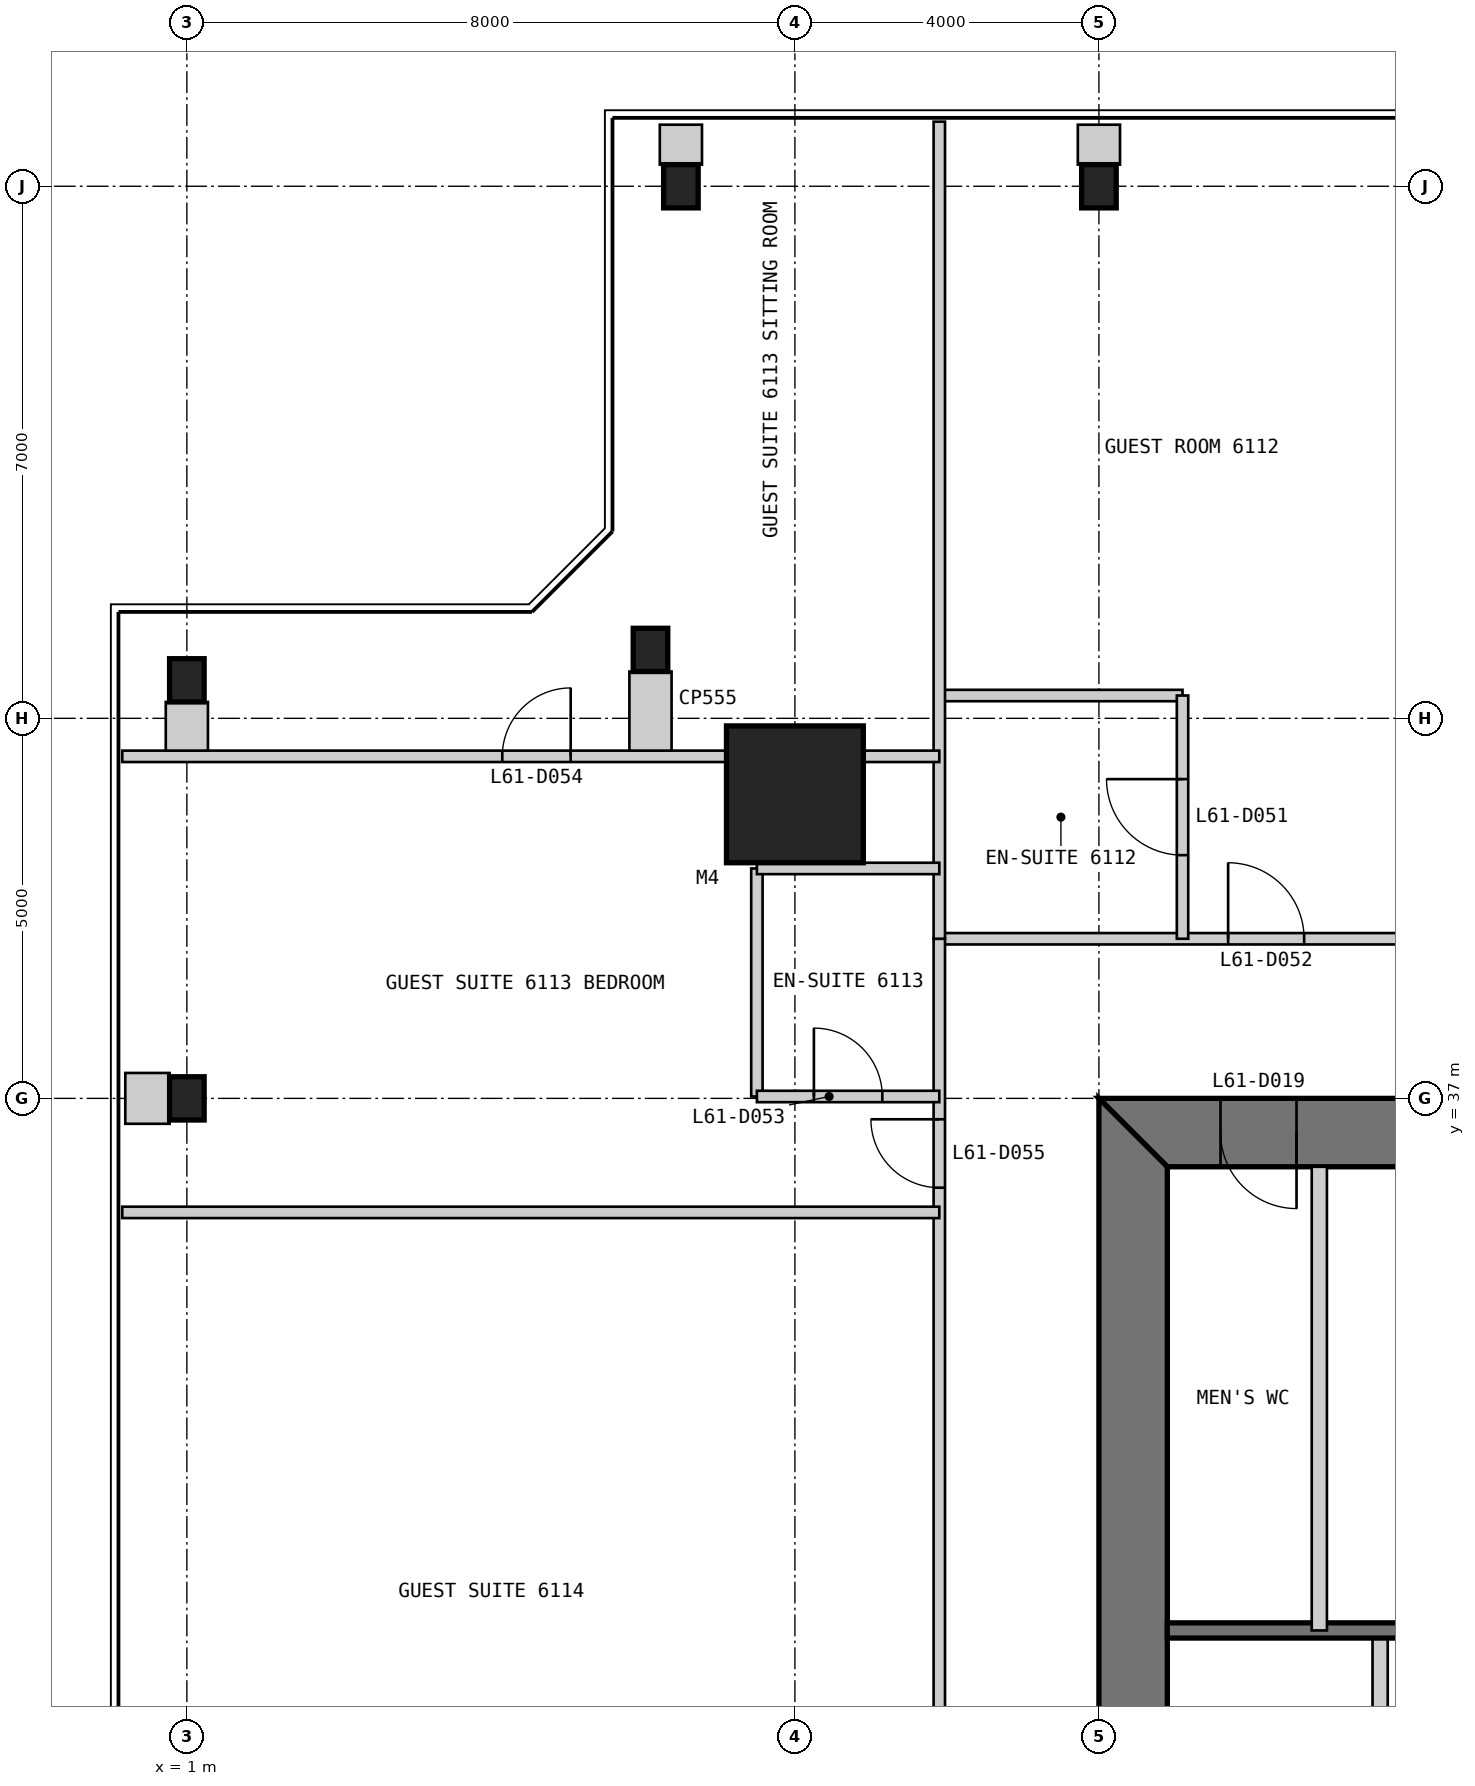
"""IFC4 building model, lengths in metres.
Left out: names, types, materials, properties, quantities, classifications, styles, units other than length and angle.
Written with IfcOpenShell. Run it as: python <this file> out.ifc"""

import sys

from ifc_helpers import new_model, si_unit, direction, frame, frame_2d, origin, origin_2d, place, context, subcontext, project, spatial, polyline, rectangle, i_section, outline, extrude, element, fill, save


model = new_model("IFC4")
c1 = context("Model", 3, precision=1e-05, world=origin(), true_north=direction((0.0, 1.0)))
c2 = subcontext(c1, "Body", "Model", "MODEL_VIEW")
j1 = project(units=[si_unit("LENGTHUNIT", "METRE"), si_unit("PLANEANGLEUNIT", "RADIAN")], contexts=[c1])
p1 = place(None, origin())
s1 = spatial("IfcSite", under=j1, at=p1, CompositionType="ELEMENT")
p2 = place(p1, origin())
s2 = spatial("IfcBuilding", under=s1, at=p2, CompositionType="ELEMENT")
p3 = place(p2, frame((0.0, 0.0, 259.4)))
s3 = spatial("IfcBuildingStorey", under=s2, at=p3, CompositionType="ELEMENT", Elevation=259.4)
p4 = place(p3, frame((9.0, 41.0, 0.0), z_axis=(0.0, 0.0, 1.0), x_axis=(1.0, 0.0, 0.0)))
e1 = element("IfcColumn", 1, at=p4, inside=s3, PredefinedType="COLUMN", context=c2, shape_type="SweptSolid", body=[
    extrude(rectangle(XDim=1.8, YDim=1.8, at=origin_2d()), origin(), (0.0, 0.0, 1.0), 3.4),
])
for number, where, z_axis, x_axis in (
    (2, (13.0, 49.0, 0.0), (0.0, 0.0, 1.0), (1.0, 0.0, 0.0)),
    (3, (7.5, 49.0, 0.0), (0.0, 0.0, 1.0), (1.0, 0.0, 0.0)),
    (4, (7.1, 42.9, 0.0), (0.0, 0.0, 1.0), (1.0, 0.0, 0.0)),
    (5, (1.0, 42.5, 0.0), (0.0, 0.0, 1.0), (1.0, 0.0, 0.0)),
    (6, (1.0, 37.0, 0.0), (0.0, 0.0, 1.0), (1.0, 0.0, 0.0)),
):
    element("IfcColumn", number, at=place(p3, frame(where, z_axis=z_axis, x_axis=x_axis)), inside=s3, PredefinedType="COLUMN", context=c2, shape_type="SweptSolid", body=[
        extrude(i_section(OverallWidth=0.455, OverallDepth=0.569, WebThickness=0.078, FlangeThickness=0.125, at=origin_2d()), origin(), (0.0, 0.0, 1.0), 3.4),
    ])
p5 = place(p3, frame((37.0, 36.55, 0.0), z_axis=(0.0, 0.0, 1.0), x_axis=(-1.0, 0.0, 0.0)))
e7 = element("IfcWall", 7, at=p5, inside=s3, PredefinedType="SHEAR", context=c2, shape_type="SweptSolid", body=[
    extrude(outline(polyline([(0.0, -0.45), (24.0, -0.45), (23.1, 0.45), (0.9, 0.45), (0.0, -0.45)])), origin(), (0.0, 0.0, 1.0), 3.4),
])
p6 = place(p5, frame((4.9, 0.0, 0.0)))
e8 = element("IfcOpeningElement", 8, at=p6, cuts=e7, PredefinedType="OPENING", context=c2, shape_type="SweptSolid", body=[
    extrude(rectangle(XDim=1.0, YDim=2.2, at=frame_2d((0.5, 1.1))), frame((0.0, 0.46, 0.0), z_axis=(0.0, -1.0, 0.0), x_axis=(1.0, 0.0, 0.0)), (0.0, 0.0, 1.0), 0.92),
])
p7 = place(p5, frame((8.9, 0.0, 0.0)))
e9 = element("IfcOpeningElement", 9, at=p7, cuts=e7, PredefinedType="OPENING", context=c2, shape_type="SweptSolid", body=[
    extrude(rectangle(XDim=1.1, YDim=2.2, at=frame_2d((0.55, 1.1))), frame((0.0, 0.46, 0.0), z_axis=(0.0, -1.0, 0.0), x_axis=(1.0, 0.0, 0.0)), (0.0, 0.0, 1.0), 0.92),
])
p8 = place(p5, frame((15.05, 0.0, 0.0)))
e10 = element("IfcOpeningElement", 10, at=p8, cuts=e7, PredefinedType="OPENING", context=c2, shape_type="SweptSolid", body=[
    extrude(rectangle(XDim=0.9, YDim=2.2, at=frame_2d((0.45, 1.1))), frame((0.0, 0.46, 0.0), z_axis=(0.0, -1.0, 0.0), x_axis=(1.0, 0.0, 0.0)), (0.0, 0.0, 1.0), 0.92),
])
p9 = place(p5, frame((17.9, 0.0, 0.0)))
e11 = element("IfcOpeningElement", 11, at=p9, cuts=e7, PredefinedType="OPENING", context=c2, shape_type="SweptSolid", body=[
    extrude(rectangle(XDim=1.0, YDim=2.2, at=frame_2d((0.5, 1.1))), frame((0.0, 0.46, 0.0), z_axis=(0.0, -1.0, 0.0), x_axis=(1.0, 0.0, 0.0)), (0.0, 0.0, 1.0), 0.92),
])
p10 = place(p5, frame((21.4, 0.0, 0.0)))
e12 = element("IfcOpeningElement", 12, at=p10, cuts=e7, PredefinedType="OPENING", context=c2, shape_type="SweptSolid", body=[
    extrude(rectangle(XDim=1.0, YDim=2.2, at=frame_2d((0.5, 1.1))), frame((0.0, 0.46, 0.0), z_axis=(0.0, -1.0, 0.0), x_axis=(1.0, 0.0, 0.0)), (0.0, 0.0, 1.0), 0.92),
])
p11 = place(p3, frame((13.45, 36.1, 0.0), z_axis=(0.0, 0.0, 1.0), x_axis=(0.0, -1.0, 0.0)))
e13 = element("IfcWall", 13, at=p11, inside=s3, PredefinedType="SHEAR", context=c2, shape_type="SweptSolid", body=[
    extrude(outline(polyline([(-0.9, -0.45), (23.1, -0.45), (22.2, 0.45), (0.0, 0.45), (-0.9, -0.45)])), origin(), (0.0, 0.0, 1.0), 3.4),
])
p12 = place(p11, frame((20.2, 0.0, 0.0)))
e14 = element("IfcOpeningElement", 14, at=p12, cuts=e13, PredefinedType="OPENING", context=c2, shape_type="SweptSolid", body=[
    extrude(rectangle(XDim=1.0, YDim=2.2, at=frame_2d((0.5, 1.1))), frame((0.0, 0.46, 0.0), z_axis=(0.0, -1.0, 0.0), x_axis=(1.0, 0.0, 0.0)), (0.0, 0.0, 1.0), 0.92),
])
p13 = place(p11, frame((17.25, 0.0, 0.0)))
e15 = element("IfcOpeningElement", 15, at=p13, cuts=e13, PredefinedType="OPENING", context=c2, shape_type="SweptSolid", body=[
    extrude(rectangle(XDim=0.9, YDim=2.2, at=frame_2d((0.45, 1.1))), frame((0.0, 0.46, 0.0), z_axis=(0.0, -1.0, 0.0), x_axis=(1.0, 0.0, 0.0)), (0.0, 0.0, 1.0), 0.92),
])
p14 = place(p3, frame((16.7, 13.9, 0.0), z_axis=(0.0, 0.0, 1.0), x_axis=(0.0, 1.0, 0.0)))
e16 = element("IfcWall", 16, at=p14, inside=s3, PredefinedType="PARTITIONING", context=c2, shape_type="SweptSolid", body=[
    extrude(rectangle(XDim=16.1, YDim=0.2, at=frame_2d((8.05, 0.0))), origin(), (0.0, 0.0, 1.0), 3.2),
])
p15 = place(p14, frame((6.15, 0.0, 0.0)))
e17 = element("IfcOpeningElement", 17, at=p15, cuts=e16, PredefinedType="OPENING", context=c2, shape_type="SweptSolid", body=[
    extrude(rectangle(XDim=0.9, YDim=2.2, at=frame_2d((0.45, 1.1))), frame((0.0, 0.11, 0.0), z_axis=(0.0, -1.0, 0.0), x_axis=(1.0, 0.0, 0.0)), (0.0, 0.0, 1.0), 0.22),
])
p16 = place(p14, frame((8.65, 0.0, 0.0)))
e18 = element("IfcOpeningElement", 18, at=p16, cuts=e16, PredefinedType="OPENING", context=c2, shape_type="SweptSolid", body=[
    extrude(rectangle(XDim=0.9, YDim=2.2, at=frame_2d((0.45, 1.1))), frame((0.0, 0.11, 0.0), z_axis=(0.0, -1.0, 0.0), x_axis=(1.0, 0.0, 0.0)), (0.0, 0.0, 1.0), 0.22),
])
p17 = place(p14, frame((12.8, 0.0, 0.0)))
e19 = element("IfcOpeningElement", 19, at=p17, cuts=e16, PredefinedType="OPENING", context=c2, shape_type="SweptSolid", body=[
    extrude(rectangle(XDim=0.9, YDim=2.2, at=frame_2d((0.45, 1.1))), frame((0.0, 0.11, 0.0), z_axis=(0.0, -1.0, 0.0), x_axis=(1.0, 0.0, 0.0)), (0.0, 0.0, 1.0), 0.22),
])
p18 = place(p3, frame((29.7, 30.0, 0.0), z_axis=(0.0, 0.0, 1.0), x_axis=(-1.0, 0.0, 0.0)))
e20 = element("IfcWall", 20, at=p18, inside=s3, PredefinedType="SOLIDWALL", context=c2, shape_type="SweptSolid", body=[
    extrude(rectangle(XDim=15.8, YDim=0.2, at=frame_2d((7.9, 0.0))), origin(), (0.0, 0.0, 1.0), 3.2),
])
p19 = place(p3, frame((15.9, 36.1, 0.0), z_axis=(0.0, 0.0, 1.0), x_axis=(0.0, -1.0, 0.0)))
e21 = element("IfcWall", 21, at=p19, inside=s3, PredefinedType="PARTITIONING", context=c2, shape_type="SweptSolid", body=[
    extrude(rectangle(XDim=6.1, YDim=0.2, at=frame_2d((3.05, 0.0))), origin(), (0.0, 0.0, 1.0), 3.2),
])
p20 = place(p3, frame((39.1, 39.1, 0.0), z_axis=(0.0, 0.0, 1.0), x_axis=(-1.0, 0.0, 0.0)))
e22 = element("IfcWall", 22, at=p20, inside=s3, PredefinedType="PARTITIONING", context=c2, shape_type="SweptSolid", body=[
    extrude(rectangle(XDim=28.2, YDim=0.15, at=frame_2d((14.1, 0.0))), origin(), (0.0, 0.0, 1.0), 3.25),
])
p21 = place(p20, frame((2.375, 0.0, 0.0)))
e23 = element("IfcOpeningElement", 23, at=p21, cuts=e22, PredefinedType="OPENING", context=c2, shape_type="SweptSolid", body=[
    extrude(rectangle(XDim=0.9, YDim=2.1, at=frame_2d((0.45, 1.05))), frame((0.0, 0.085, 0.0), z_axis=(0.0, -1.0, 0.0), x_axis=(1.0, 0.0, 0.0)), (0.0, 0.0, 1.0), 0.17),
])
p22 = place(p20, frame((10.7, 0.0, 0.0)))
e24 = element("IfcOpeningElement", 24, at=p22, cuts=e22, PredefinedType="OPENING", context=c2, shape_type="SweptSolid", body=[
    extrude(rectangle(XDim=0.9, YDim=2.1, at=frame_2d((0.45, 1.05))), frame((0.0, 0.085, 0.0), z_axis=(0.0, -1.0, 0.0), x_axis=(1.0, 0.0, 0.0)), (0.0, 0.0, 1.0), 0.17),
])
p23 = place(p20, frame((17.1, 0.0, 0.0)))
e25 = element("IfcOpeningElement", 25, at=p23, cuts=e22, PredefinedType="OPENING", context=c2, shape_type="SweptSolid", body=[
    extrude(rectangle(XDim=0.9, YDim=2.1, at=frame_2d((0.45, 1.05))), frame((0.0, 0.085, 0.0), z_axis=(0.0, -1.0, 0.0), x_axis=(1.0, 0.0, 0.0)), (0.0, 0.0, 1.0), 0.17),
])
p24 = place(p20, frame((23.4, 0.0, 0.0)))
e26 = element("IfcOpeningElement", 26, at=p24, cuts=e22, PredefinedType="OPENING", context=c2, shape_type="SweptSolid", body=[
    extrude(rectangle(XDim=1.0, YDim=2.1, at=frame_2d((0.5, 1.05))), frame((0.0, 0.085, 0.0), z_axis=(0.0, -1.0, 0.0), x_axis=(1.0, 0.0, 0.0)), (0.0, 0.0, 1.0), 0.17),
])
p25 = place(p3, frame((14.1, 42.3, 0.0), z_axis=(0.0, 0.0, 1.0), x_axis=(-1.0, 0.0, 0.0)))
e27 = element("IfcWall", 27, at=p25, inside=s3, PredefinedType="PARTITIONING", context=c2, shape_type="SweptSolid", body=[
    extrude(rectangle(XDim=3.2, YDim=0.15, at=frame_2d((1.6, 0.0))), origin(), (0.0, 0.0, 1.0), 3.25),
])
p26 = place(p3, frame((14.1, 42.3, 0.0), z_axis=(0.0, 0.0, 1.0), x_axis=(0.0, -1.0, 0.0)))
e28 = element("IfcWall", 28, at=p26, inside=s3, PredefinedType="PARTITIONING", context=c2, shape_type="SweptSolid", body=[
    extrude(rectangle(XDim=3.2, YDim=0.15, at=frame_2d((1.6, 0.0))), origin(), (0.0, 0.0, 1.0), 3.25),
])
p27 = place(p26, frame((1.1, 0.0, 0.0)))
e29 = element("IfcOpeningElement", 29, at=p27, cuts=e28, PredefinedType="OPENING", context=c2, shape_type="SweptSolid", body=[
    extrude(rectangle(XDim=1.0, YDim=2.1, at=frame_2d((0.5, 1.05))), frame((0.0, 0.085, 0.0), z_axis=(0.0, -1.0, 0.0), x_axis=(1.0, 0.0, 0.0)), (0.0, 0.0, 1.0), 0.17),
])
p28 = place(p3, frame((10.9, 39.1, 0.0), z_axis=(0.0, 0.0, 1.0), x_axis=(0.0, -1.0, 0.0)))
e30 = element("IfcWall", 30, at=p28, inside=s3, PredefinedType="PARTITIONING", context=c2, shape_type="SweptSolid", body=[
    extrude(rectangle(XDim=28.2, YDim=0.15, at=frame_2d((14.1, 0.0))), origin(), (0.0, 0.0, 1.0), 3.25),
])
p29 = place(p28, frame((2.375, 0.0, 0.0)))
e31 = element("IfcOpeningElement", 31, at=p29, cuts=e30, PredefinedType="OPENING", context=c2, shape_type="SweptSolid", body=[
    extrude(rectangle(XDim=0.9, YDim=2.1, at=frame_2d((0.45, 1.05))), frame((0.0, 0.085, 0.0), z_axis=(0.0, -1.0, 0.0), x_axis=(1.0, 0.0, 0.0)), (0.0, 0.0, 1.0), 0.17),
])
p30 = place(p28, frame((10.7, 0.0, 0.0)))
e32 = element("IfcOpeningElement", 32, at=p30, cuts=e30, PredefinedType="OPENING", context=c2, shape_type="SweptSolid", body=[
    extrude(rectangle(XDim=0.9, YDim=2.1, at=frame_2d((0.45, 1.05))), frame((0.0, 0.085, 0.0), z_axis=(0.0, -1.0, 0.0), x_axis=(1.0, 0.0, 0.0)), (0.0, 0.0, 1.0), 0.17),
])
p31 = place(p28, frame((17.1, 0.0, 0.0)))
e33 = element("IfcOpeningElement", 33, at=p31, cuts=e30, PredefinedType="OPENING", context=c2, shape_type="SweptSolid", body=[
    extrude(rectangle(XDim=0.9, YDim=2.1, at=frame_2d((0.45, 1.05))), frame((0.0, 0.085, 0.0), z_axis=(0.0, -1.0, 0.0), x_axis=(1.0, 0.0, 0.0)), (0.0, 0.0, 1.0), 0.17),
])
p32 = place(p28, frame((23.7, 0.0, 0.0)))
e34 = element("IfcOpeningElement", 34, at=p32, cuts=e30, PredefinedType="OPENING", context=c2, shape_type="SweptSolid", body=[
    extrude(rectangle(XDim=0.9, YDim=2.1, at=frame_2d((0.45, 1.05))), frame((0.0, 0.085, 0.0), z_axis=(0.0, -1.0, 0.0), x_axis=(1.0, 0.0, 0.0)), (0.0, 0.0, 1.0), 0.17),
])
p33 = place(p3, frame((10.9, 49.85, 0.0), z_axis=(0.0, 0.0, 1.0), x_axis=(0.0, -1.0, 0.0)))
e35 = element("IfcWall", 35, at=p33, inside=s3, PredefinedType="PARTITIONING", context=c2, shape_type="SweptSolid", body=[
    extrude(rectangle(XDim=10.75, YDim=0.15, at=frame_2d((5.375, 0.0))), origin(), (0.0, 0.0, 1.0), 3.25),
])
p34 = place(p3, frame((8.5, 40.025, 0.0), z_axis=(0.0, 0.0, 1.0), x_axis=(0.0, -1.0, 0.0)))
e36 = element("IfcWall", 36, at=p34, inside=s3, PredefinedType="PARTITIONING", context=c2, shape_type="SweptSolid", body=[
    extrude(rectangle(XDim=3.0, YDim=0.15, at=frame_2d((1.5, 0.0))), origin(), (0.0, 0.0, 1.0), 3.25),
])
p35 = place(p3, frame((8.5, 37.025, 0.0), z_axis=(0.0, 0.0, 1.0), x_axis=(1.0, 0.0, 0.0)))
e37 = element("IfcWall", 37, at=p35, inside=s3, PredefinedType="PARTITIONING", context=c2, shape_type="SweptSolid", body=[
    extrude(rectangle(XDim=2.4, YDim=0.15, at=frame_2d((1.2, 0.0))), origin(), (0.0, 0.0, 1.0), 2.404),
])
p36 = place(p35, frame((0.75, 0.0, 0.0)))
e38 = element("IfcOpeningElement", 38, at=p36, cuts=e37, PredefinedType="OPENING", context=c2, shape_type="SweptSolid", body=[
    extrude(rectangle(XDim=0.9, YDim=2.1, at=frame_2d((0.45, 1.05))), frame((0.0, 0.085, 0.0), z_axis=(0.0, -1.0, 0.0), x_axis=(1.0, 0.0, 0.0)), (0.0, 0.0, 1.0), 0.17),
])
p37 = place(p3, frame((8.5, 40.025, 0.0), z_axis=(0.0, 0.0, 1.0), x_axis=(1.0, 0.0, 0.0)))
e39 = element("IfcWall", 39, at=p37, inside=s3, PredefinedType="PARTITIONING", context=c2, shape_type="SweptSolid", body=[
    extrude(rectangle(XDim=2.4, YDim=0.15, at=frame_2d((1.2, 0.0))), origin(), (0.0, 0.0, 1.0), 3.25),
])
p38 = place(p3, frame((0.15, 41.5, 0.0), z_axis=(0.0, 0.0, 1.0), x_axis=(1.0, 0.0, 0.0)))
e40 = element("IfcWall", 40, at=p38, inside=s3, PredefinedType="PARTITIONING", context=c2, shape_type="SweptSolid", body=[
    extrude(rectangle(XDim=10.75, YDim=0.15, at=frame_2d((5.375, 0.0))), origin(), (0.0, 0.0, 1.0), 3.25),
])
p39 = place(p38, frame((5.0, 0.0, 0.0)))
e41 = element("IfcOpeningElement", 41, at=p39, cuts=e40, PredefinedType="OPENING", context=c2, shape_type="SweptSolid", body=[
    extrude(rectangle(XDim=0.9, YDim=2.1, at=frame_2d((0.45, 1.05))), frame((0.0, 0.085, 0.0), z_axis=(0.0, -1.0, 0.0), x_axis=(1.0, 0.0, 0.0)), (0.0, 0.0, 1.0), 0.17),
])
p40 = place(p3, frame((0.15, 35.5, 0.0), z_axis=(0.0, 0.0, 1.0), x_axis=(1.0, 0.0, 0.0)))
e42 = element("IfcWall", 42, at=p40, inside=s3, PredefinedType="PARTITIONING", context=c2, shape_type="SweptSolid", body=[
    extrude(rectangle(XDim=10.75, YDim=0.15, at=frame_2d((5.375, 0.0))), origin(), (0.0, 0.0, 1.0), 3.25),
])
for number, where, z_axis, x_axis in (
    (43, (13.0, 49.81, 0.0), (0.0, 0.0, 1.0), (0.0, -1.0, 0.0)),
    (44, (7.5, 49.81, 0.0), (0.0, 0.0, 1.0), (0.0, -1.0, 0.0)),
):
    element("IfcWall", number, at=place(p3, frame(where, z_axis=z_axis, x_axis=x_axis)), inside=s3, PredefinedType="PARTITIONING", context=c2, shape_type="SweptSolid", body=[
        extrude(rectangle(XDim=0.526, YDim=0.555, at=frame_2d((0.263, 0.0))), origin(), (0.0, 0.0, 1.0), 3.25),
    ])
p41 = place(p3, frame((7.1, 41.575, 0.0), z_axis=(0.0, 0.0, 1.0), x_axis=(0.0, 1.0, 0.0)))
e45 = element("IfcWall", 45, at=p41, inside=s3, PredefinedType="PARTITIONING", context=c2, shape_type="SweptSolid", body=[
    extrude(rectangle(XDim=1.041, YDim=0.555, at=frame_2d((0.52, 0.0))), origin(), (0.0, 0.0, 1.0), 3.25),
])
p42 = place(p3, frame((1.0, 41.575, 0.0), z_axis=(0.0, 0.0, 1.0), x_axis=(0.0, 1.0, 0.0)))
e46 = element("IfcWall", 46, at=p42, inside=s3, PredefinedType="PARTITIONING", context=c2, shape_type="SweptSolid", body=[
    extrude(rectangle(XDim=0.641, YDim=0.555, at=frame_2d((0.32, 0.0))), origin(), (0.0, 0.0, 1.0), 2.338),
])
p43 = place(p3, frame((0.19, 37.0, 0.0), z_axis=(0.0, 0.0, 1.0), x_axis=(1.0, 0.0, 0.0)))
e47 = element("IfcWall", 47, at=p43, inside=s3, PredefinedType="PARTITIONING", context=c2, shape_type="SweptSolid", body=[
    extrude(rectangle(XDim=0.583, YDim=0.669, at=frame_2d((0.292, 0.0))), origin(), (0.0, 0.0, 1.0), 3.25),
])
p44 = place(p10, origin())
e48 = element("IfcDoor", 48, at=p44, inside=s3, OperationType="SINGLE_SWING_LEFT", PredefinedType="DOOR", context=c2, shape_type="SweptSolid", body=[
    extrude(rectangle(XDim=1.0, YDim=2.2, at=frame_2d((0.5, 1.1))), frame((0.0, 0.025, 0.0), z_axis=(0.0, -1.0, 0.0), x_axis=(1.0, 0.0, 0.0)), (0.0, 0.0, 1.0), 0.05),
    extrude(outline(polyline([(0.0, 0.0), (0.04, 0.0), (0.04, 2.16), (0.96, 2.16), (0.96, 0.0), (1.0, 0.0), (1.0, 2.2), (0.0, 2.2), (0.0, 0.0)])), frame((0.0, 0.3, 0.0), z_axis=(0.0, -1.0, 0.0), x_axis=(1.0, 0.0, 0.0)), (0.0, 0.0, 1.0), 0.6),
])
fill(e12, e48)
p45 = place(p27, frame((1.0, 0.0, 0.0), z_axis=(0.0, 0.0, 1.0), x_axis=(-1.0, 0.0, 0.0)))
e49 = element("IfcDoor", 49, at=p45, inside=s3, OperationType="SINGLE_SWING_RIGHT", PredefinedType="DOOR", context=c2, shape_type="SweptSolid", body=[
    extrude(rectangle(XDim=1.0, YDim=2.1, at=frame_2d((0.5, 1.05))), frame((0.0, 0.025, 0.0), z_axis=(0.0, -1.0, 0.0), x_axis=(1.0, 0.0, 0.0)), (0.0, 0.0, 1.0), 0.05),
])
fill(e29, e49)
p46 = place(p24, frame((1.0, 0.0, 0.0), z_axis=(0.0, 0.0, 1.0), x_axis=(-1.0, 0.0, 0.0)))
e50 = element("IfcDoor", 50, at=p46, inside=s3, OperationType="SINGLE_SWING_LEFT", PredefinedType="DOOR", context=c2, shape_type="SweptSolid", body=[
    extrude(rectangle(XDim=1.0, YDim=2.1, at=frame_2d((0.5, 1.05))), frame((0.0, 0.025, 0.0), z_axis=(0.0, -1.0, 0.0), x_axis=(1.0, 0.0, 0.0)), (0.0, 0.0, 1.0), 0.05),
])
fill(e26, e50)
p47 = place(p36, origin())
e51 = element("IfcDoor", 51, at=p47, inside=s3, OperationType="SINGLE_SWING_LEFT", PredefinedType="DOOR", context=c2, shape_type="SweptSolid", body=[
    extrude(rectangle(XDim=0.9, YDim=2.1, at=frame_2d((0.45, 1.05))), frame((0.0, 0.025, 0.0), z_axis=(0.0, -1.0, 0.0), x_axis=(1.0, 0.0, 0.0)), (0.0, 0.0, 1.0), 0.05),
])
fill(e38, e51)
p48 = place(p39, origin())
e52 = element("IfcDoor", 52, at=p48, inside=s3, OperationType="SINGLE_SWING_RIGHT", PredefinedType="DOOR", context=c2, shape_type="SweptSolid", body=[
    extrude(rectangle(XDim=0.9, YDim=2.1, at=frame_2d((0.45, 1.05))), frame((0.0, 0.025, 0.0), z_axis=(0.0, -1.0, 0.0), x_axis=(1.0, 0.0, 0.0)), (0.0, 0.0, 1.0), 0.05),
])
fill(e41, e52)
p49 = place(p29, frame((0.9, 0.0, 0.0), z_axis=(0.0, 0.0, 1.0), x_axis=(-1.0, 0.0, 0.0)))
e53 = element("IfcDoor", 53, at=p49, inside=s3, OperationType="SINGLE_SWING_RIGHT", PredefinedType="DOOR", context=c2, shape_type="SweptSolid", body=[
    extrude(rectangle(XDim=0.9, YDim=2.1, at=frame_2d((0.45, 1.05))), frame((0.0, 0.025, 0.0), z_axis=(0.0, -1.0, 0.0), x_axis=(1.0, 0.0, 0.0)), (0.0, 0.0, 1.0), 0.05),
])
fill(e31, e53)
save(model, sys.argv[1])
